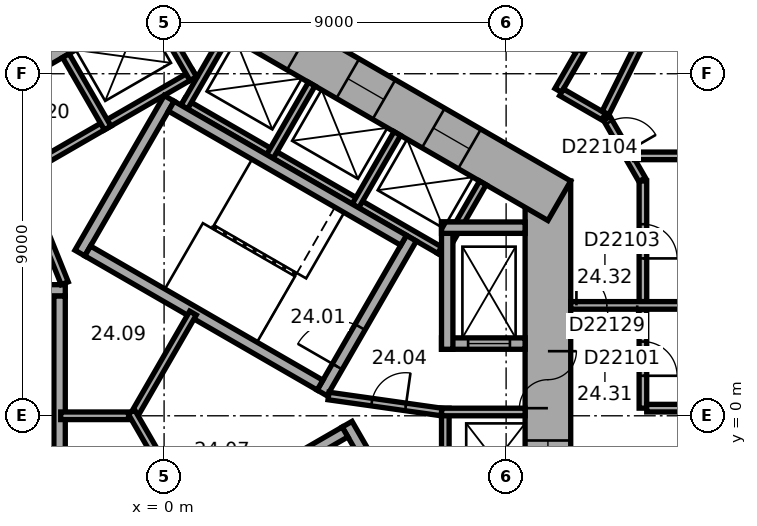
"""IFC4 building model, lengths in metres.
Left out: names, types, materials, properties, quantities, classifications, styles, units other than length and angle.
Written with IfcOpenShell. Run it as: python <this file> out.ifc"""

import sys

from ifc_helpers import new_model, si_unit, direction, frame, frame_2d, origin, place, context, subcontext, project, spatial, rectangle, extrude, element, fill, save


model = new_model("IFC4")
c1 = context("Model", 3, precision=1e-05, world=origin(), true_north=direction((0.0, 1.0)))
c2 = subcontext(c1, "Body", "Model", "MODEL_VIEW")
j1 = project(units=[si_unit("LENGTHUNIT", "METRE"), si_unit("PLANEANGLEUNIT", "RADIAN")], contexts=[c1])
p1 = place(None, origin())
s1 = spatial("IfcSite", under=j1, at=p1, CompositionType="ELEMENT")
p2 = place(p1, origin())
s2 = spatial("IfcBuilding", under=s1, at=p2, CompositionType="ELEMENT")
p3 = place(p2, frame((0.0, 0.0, 103.4)))
s3 = spatial("IfcBuildingStorey", under=s2, at=p3, CompositionType="ELEMENT", Elevation=103.4)
p4 = place(p3, frame((10.1, -6.177, 0.0), z_axis=(0.0, 0.0, 1.0), x_axis=(0.0, 1.0, 0.0)))
e1 = element("IfcWall", 1, at=p4, inside=s3, PredefinedType="SHEAR", context=c2, shape_type="SweptSolid", body=[
    extrude(rectangle(XDim=12.355, YDim=1.2, at=frame_2d((6.177, 0.0))), origin(), (0.0, 0.0, 1.0), 3.3),
])
p5 = place(p4, frame((6.378, 0.0, 0.0)))
e2 = element("IfcOpeningElement", 2, at=p5, cuts=e1, PredefinedType="OPENING", context=c2, shape_type="SweptSolid", body=[
    extrude(rectangle(XDim=1.5, YDim=2.1, at=frame_2d((0.75, 1.05))), frame((0.0, 0.61, 0.0), z_axis=(0.0, -1.0, 0.0), x_axis=(1.0, 0.0, 0.0)), (0.0, 0.0, 1.0), 1.22),
])
p6 = place(p4, frame((1.828, 0.0, 0.0)))
e3 = element("IfcOpeningElement", 3, at=p6, cuts=e1, PredefinedType="OPENING", context=c2, shape_type="SweptSolid", body=[
    extrude(rectangle(XDim=1.1, YDim=2.1, at=frame_2d((0.55, 1.05))), frame((0.0, 0.61, 0.0), z_axis=(0.0, -1.0, 0.0), x_axis=(1.0, 0.0, 0.0)), (0.0, 0.0, 1.0), 1.22),
])
p7 = place(p4, frame((4.427, 0.0, 0.0)))
e4 = element("IfcOpeningElement", 4, at=p7, cuts=e1, PredefinedType="OPENING", context=c2, shape_type="SweptSolid", body=[
    extrude(rectangle(XDim=1.1, YDim=2.1, at=frame_2d((0.55, 1.05))), frame((0.0, 0.61, 0.0), z_axis=(0.0, -1.0, 0.0), x_axis=(1.0, 0.0, 0.0)), (0.0, 0.0, 1.0), 1.22),
])
p8 = place(p3, frame((10.4, 5.658, 0.0), z_axis=(0.0, 0.0, 1.0), x_axis=(-0.866021384402, 0.500006961711, 0.0)))
e5 = element("IfcWall", 5, at=p8, inside=s3, PredefinedType="SHEAR", context=c2, shape_type="SweptSolid", body=[
    extrude(rectangle(XDim=12.355, YDim=1.2, at=frame_2d((6.178, 0.0))), origin(), (0.0, 0.0, 1.0), 3.3),
])
p9 = place(p8, frame((2.728, 0.0, 0.0)))
e6 = element("IfcOpeningElement", 6, at=p9, cuts=e5, PredefinedType="OPENING", context=c2, shape_type="SweptSolid", body=[
    extrude(rectangle(XDim=1.1, YDim=2.1, at=frame_2d((0.55, 1.05))), frame((0.0, 0.61, 0.0), z_axis=(0.0, -1.0, 0.0), x_axis=(1.0, 0.0, 0.0)), (0.0, 0.0, 1.0), 1.22),
])
p10 = place(p8, frame((5.328, 0.0, 0.0)))
e7 = element("IfcOpeningElement", 7, at=p10, cuts=e5, PredefinedType="OPENING", context=c2, shape_type="SweptSolid", body=[
    extrude(rectangle(XDim=1.1, YDim=2.1, at=frame_2d((0.55, 1.05))), frame((0.0, 0.61, 0.0), z_axis=(0.0, -1.0, 0.0), x_axis=(1.0, 0.0, 0.0)), (0.0, 0.0, 1.0), 1.22),
])
p11 = place(p8, frame((7.928, 0.0, 0.0)))
e8 = element("IfcOpeningElement", 8, at=p11, cuts=e5, PredefinedType="OPENING", context=c2, shape_type="SweptSolid", body=[
    extrude(rectangle(XDim=1.1, YDim=2.1, at=frame_2d((0.55, 1.05))), frame((0.0, 0.61, 0.0), z_axis=(0.0, -1.0, 0.0), x_axis=(1.0, 0.0, 0.0)), (0.0, 0.0, 1.0), 1.22),
])
p12 = place(p3, frame((0.3, 11.836, 0.0), z_axis=(0.0, 0.0, 1.0), x_axis=(-0.866021384402, -0.500006961711, 0.0)))
e9 = element("IfcWall", 9, at=p12, inside=s3, PredefinedType="SHEAR", context=c2, shape_type="SweptSolid", body=[
    extrude(rectangle(XDim=12.355, YDim=1.2, at=frame_2d((6.178, 0.0))), origin(), (0.0, 0.0, 1.0), 3.3),
])
p13 = place(p12, frame((6.378, 0.0, 0.0)))
e10 = element("IfcOpeningElement", 10, at=p13, cuts=e9, PredefinedType="OPENING", context=c2, shape_type="SweptSolid", body=[
    extrude(rectangle(XDim=1.5, YDim=2.1, at=frame_2d((0.75, 1.05))), frame((0.0, 0.61, 0.0), z_axis=(0.0, -1.0, 0.0), x_axis=(1.0, 0.0, 0.0)), (0.0, 0.0, 1.0), 1.22),
])
p14 = place(p12, frame((1.828, 0.0, 0.0)))
e11 = element("IfcOpeningElement", 11, at=p14, cuts=e9, PredefinedType="OPENING", context=c2, shape_type="SweptSolid", body=[
    extrude(rectangle(XDim=1.1, YDim=2.1, at=frame_2d((0.55, 1.05))), frame((0.0, 0.61, 0.0), z_axis=(0.0, -1.0, 0.0), x_axis=(1.0, 0.0, 0.0)), (0.0, 0.0, 1.0), 1.22),
])
p15 = place(p3, frame((7.4, -5.2, 0.0), z_axis=(0.0, 0.0, 1.0), x_axis=(0.0, 1.0, 0.0)))
e12 = element("IfcWall", 12, at=p15, inside=s3, PredefinedType="PARTITIONING", context=c2, shape_type="SweptSolid", body=[
    extrude(rectangle(XDim=5.4, YDim=0.2, at=frame_2d((2.7, 0.0))), origin(), (0.0, 0.0, 1.0), 3.05),
])
p16 = place(p3, frame((7.3, 0.1, 0.0), z_axis=(0.0, 0.0, 1.0), x_axis=(1.0, 0.0, 0.0)))
e13 = element("IfcWall", 13, at=p16, inside=s3, PredefinedType="PARTITIONING", context=c2, shape_type="SweptSolid", body=[
    extrude(rectangle(XDim=2.2, YDim=0.2, at=frame_2d((1.1, 0.0))), origin(), (0.0, 0.0, 1.0), 3.05),
])
p17 = place(p3, frame((7.424, 4.259, 0.0), z_axis=(0.0, 0.0, 1.0), x_axis=(-0.866026010844, 0.49999894854, 0.0)))
e14 = element("IfcWall", 14, at=p17, inside=s3, PredefinedType="PARTITIONING", context=c2, shape_type="SweptSolid", body=[
    extrude(rectangle(XDim=8.0, YDim=0.2, at=frame_2d((4.0, 0.0))), origin(), (0.0, 0.0, 1.0), 3.05),
])
for number, where, z_axis, x_axis in (
    (15, (7.287, 4.222, 0.0), (0.0, 0.0, 1.0), (0.5, 0.866, 0.0)),
    (16, (5.036, 5.522, 0.0), (0.0, 0.0, 1.0), (0.5, 0.866, 0.0)),
    (17, (2.784, 6.822, 0.0), (0.0, 0.0, 1.0), (0.5, 0.866, 0.0)),
    (18, (0.532, 8.122, 0.0), (0.0, 0.0, 1.0), (0.5, 0.866, 0.0)),
):
    element("IfcWall", number, at=place(p3, frame(where, z_axis=z_axis, x_axis=x_axis)), inside=s3, PredefinedType="PARTITIONING", context=c2, shape_type="SweptSolid", body=[
        extrude(rectangle(XDim=2.2, YDim=0.2, at=frame_2d((1.1, 0.0))), origin(), (0.0, 0.0, 1.0), 3.05),
    ])
p18 = place(p3, frame((0.803, 9.009, 0.0), z_axis=(0.0, 0.0, 1.0), x_axis=(-0.866028230842, -0.499995103361, 0.0)))
e19 = element("IfcWall", 19, at=p18, inside=s3, PredefinedType="PARTITIONING", context=c2, shape_type="SweptSolid", body=[
    extrude(rectangle(XDim=5.4, YDim=0.2, at=frame_2d((2.7, 0.0))), origin(), (0.0, 0.0, 1.0), 3.05),
])
p19 = place(p3, frame((0.767, 8.872, 0.0), z_axis=(0.0, 0.0, 1.0), x_axis=(-0.499994660107, 0.866028486751, 0.0)))
e20 = element("IfcWall", 20, at=p19, inside=s3, PredefinedType="PARTITIONING", context=c2, shape_type="SweptSolid", body=[
    extrude(rectangle(XDim=2.2, YDim=0.2, at=frame_2d((1.1, 0.0))), origin(), (0.0, 0.0, 1.0), 3.05),
])
p20 = place(p3, frame((-1.485, 7.572, 0.0), z_axis=(0.0, 0.0, 1.0), x_axis=(-0.50002983664, 0.866008176907, 0.0)))
e21 = element("IfcWall", 21, at=p20, inside=s3, PredefinedType="PARTITIONING", context=c2, shape_type="SweptSolid", body=[
    extrude(rectangle(XDim=2.2, YDim=0.2, at=frame_2d((1.1, 0.0))), origin(), (0.0, 0.0, 1.0), 3.05),
])
p21 = place(p3, frame((4.158, 0.602, 0.0), z_axis=(0.0, 0.0, 1.0), x_axis=(0.499977259774, 0.866038532462, 0.0)))
e22 = element("IfcWall", 22, at=p21, inside=s3, PredefinedType="SHEAR", context=c2, shape_type="SweptSolid", body=[
    extrude(rectangle(XDim=4.7, YDim=0.3, at=frame_2d((2.35, 0.0))), origin(), (0.0, 0.0, 1.0), 3.05),
])
p22 = place(p21, frame((0.8, 0.0, 0.0)))
e23 = element("IfcOpeningElement", 23, at=p22, cuts=e22, PredefinedType="OPENING", context=c2, shape_type="SweptSolid", body=[
    extrude(rectangle(XDim=1.2, YDim=2.1, at=frame_2d((0.6, 1.05))), frame((0.0, 0.16, 0.0), z_axis=(0.0, -1.0, 0.0), x_axis=(1.0, 0.0, 0.0)), (0.0, 0.0, 1.0), 0.32),
])
p23 = place(p3, frame((-2.216, 4.282, 0.0), z_axis=(0.0, 0.0, 1.0), x_axis=(0.499977259774, 0.866038532462, 0.0)))
e24 = element("IfcWall", 24, at=p23, inside=s3, PredefinedType="SHEAR", context=c2, shape_type="SweptSolid", body=[
    extrude(rectangle(XDim=4.7, YDim=0.3, at=frame_2d((2.35, 0.0))), origin(), (0.0, 0.0, 1.0), 3.05),
])
for number, where, z_axis, x_axis in (
    (25, (4.103, 0.807, 0.0), (0.0, 0.0, 1.0), (-0.866, 0.5, 0.0)),
    (26, (6.303, 4.617, 0.0), (0.0, 0.0, 1.0), (-0.866, 0.5, 0.0)),
):
    element("IfcWall", number, at=place(p3, frame(where, z_axis=z_axis, x_axis=x_axis)), inside=s3, PredefinedType="SHEAR", context=c2, shape_type="SweptSolid", body=[
        extrude(rectangle(XDim=7.06, YDim=0.3, at=frame_2d((3.53, 0.0))), origin(), (0.0, 0.0, 1.0), 3.05),
    ])
p24 = place(p3, frame((-2.6, 3.3, 0.0), z_axis=(0.0, 0.0, 1.0), x_axis=(-1.0, 0.0, 0.0)))
e27 = element("IfcWall", 27, at=p24, inside=s3, PredefinedType="SHEAR", context=c2, shape_type="SweptSolid", body=[
    extrude(rectangle(XDim=4.7, YDim=0.3, at=frame_2d((2.35, 0.0))), origin(), (0.0, 0.0, 1.0), 3.05),
])
p25 = place(p24, frame((0.8, 0.0, 0.0)))
e28 = element("IfcOpeningElement", 28, at=p25, cuts=e27, PredefinedType="OPENING", context=c2, shape_type="SweptSolid", body=[
    extrude(rectangle(XDim=1.2, YDim=2.1, at=frame_2d((0.6, 1.05))), frame((0.0, 0.16, 0.0), z_axis=(0.0, -1.0, 0.0), x_axis=(1.0, 0.0, 0.0)), (0.0, 0.0, 1.0), 0.32),
])
p26 = place(p3, frame((-2.75, 3.15, 0.0), z_axis=(0.0, 0.0, 1.0), x_axis=(0.0, -1.0, 0.0)))
e29 = element("IfcWall", 29, at=p26, inside=s3, PredefinedType="SHEAR", context=c2, shape_type="SweptSolid", body=[
    extrude(rectangle(XDim=7.06, YDim=0.3, at=frame_2d((3.53, 0.0))), origin(), (0.0, 0.0, 1.0), 3.05),
])
p27 = place(p3, frame((4.816, -0.222, 0.0), z_axis=(0.0, 0.0, 1.0), x_axis=(0.499977259774, -0.866038532462, 0.0)))
e30 = element("IfcWall", 30, at=p27, inside=s3, PredefinedType="SHEAR", context=c2, shape_type="SweptSolid", body=[
    extrude(rectangle(XDim=4.7, YDim=0.3, at=frame_2d((2.35, 0.0))), origin(), (0.0, 0.0, 1.0), 3.05),
])
p28 = place(p3, frame((-1.353, -3.957, 0.0), z_axis=(0.0, 0.0, 1.0), x_axis=(0.866027801685, 0.499995846692, 0.0)))
e31 = element("IfcWall", 31, at=p28, inside=s3, PredefinedType="SHEAR", context=c2, shape_type="SweptSolid", body=[
    extrude(rectangle(XDim=7.06, YDim=0.3, at=frame_2d((3.53, 0.0))), origin(), (0.0, 0.0, 1.0), 3.05),
])
p29 = place(p3, frame((7.3, 1.9, 0.0), z_axis=(0.0, 0.0, 1.0), x_axis=(1.0, 0.0, 0.0)))
e32 = element("IfcWall", 32, at=p29, inside=s3, PredefinedType="SHEAR", context=c2, shape_type="SweptSolid", body=[
    extrude(rectangle(XDim=2.2, YDim=0.3, at=frame_2d((1.1, 0.0))), origin(), (0.0, 0.0, 1.0), 3.05),
])
p30 = place(p29, frame((0.7, 0.0, 0.0)))
e33 = element("IfcOpeningElement", 33, at=p30, cuts=e32, PredefinedType="OPENING", context=c2, shape_type="SweptSolid", body=[
    extrude(rectangle(XDim=1.1, YDim=2.1, at=frame_2d((0.55, 1.05))), frame((0.0, 0.16, 0.0), z_axis=(0.0, -1.0, 0.0), x_axis=(1.0, 0.0, 0.0)), (0.0, 0.0, 1.0), 0.32),
])
p31 = place(p3, frame((7.45, 1.75, 0.0), z_axis=(0.0, 0.0, 1.0), x_axis=(0.0, 1.0, 0.0)))
e34 = element("IfcWall", 34, at=p31, inside=s3, PredefinedType="SHEAR", context=c2, shape_type="SweptSolid", body=[
    extrude(rectangle(XDim=3.35, YDim=0.3, at=frame_2d((1.675, 0.0))), origin(), (0.0, 0.0, 1.0), 3.05),
])
p32 = place(p3, frame((7.3, 4.95, 0.0), z_axis=(0.0, 0.0, 1.0), x_axis=(1.0, 0.0, 0.0)))
e35 = element("IfcWall", 35, at=p32, inside=s3, PredefinedType="SHEAR", context=c2, shape_type="SweptSolid", body=[
    extrude(rectangle(XDim=2.2, YDim=0.3, at=frame_2d((1.1, 0.0))), origin(), (0.0, 0.0, 1.0), 3.05),
])
p33 = place(p3, frame((4.327, 0.521, 0.0), z_axis=(0.0, 0.0, 1.0), x_axis=(0.990124376366, -0.14019172346, 0.0)))
e36 = element("IfcWall", 36, at=p33, inside=s3, PredefinedType="PARTITIONING", context=c2, shape_type="SweptSolid", body=[
    extrude(rectangle(XDim=3.002, YDim=0.2, at=frame_2d((1.501, 0.0))), origin(), (0.0, 0.0, 1.0), 3.05),
])
p34 = place(p33, frame((1.15, 0.0, 0.0)))
e37 = element("IfcOpeningElement", 37, at=p34, cuts=e36, PredefinedType="OPENING", context=c2, shape_type="SweptSolid", body=[
    extrude(rectangle(XDim=0.9, YDim=2.1, at=frame_2d((0.45, 1.05))), frame((0.0, 0.11, 0.0), z_axis=(0.0, -1.0, 0.0), x_axis=(1.0, 0.0, 0.0)), (0.0, 0.0, 1.0), 0.22),
])
p35 = place(p3, frame((-2.615, 3.487, 0.0), z_axis=(0.0, 0.0, 1.0), x_axis=(-0.373576831041, 0.92759924068, 0.0)))
e38 = element("IfcWall", 38, at=p35, inside=s3, PredefinedType="PARTITIONING", context=c2, shape_type="SweptSolid", body=[
    extrude(rectangle(XDim=3.002, YDim=0.2, at=frame_2d((1.501, 0.0))), origin(), (0.0, 0.0, 1.0), 3.05),
])
p36 = place(p35, frame((1.15, 0.0, 0.0)))
e39 = element("IfcOpeningElement", 39, at=p36, cuts=e38, PredefinedType="OPENING", context=c2, shape_type="SweptSolid", body=[
    extrude(rectangle(XDim=0.9, YDim=2.1, at=frame_2d((0.45, 1.05))), frame((0.0, 0.11, 0.0), z_axis=(0.0, -1.0, 0.0), x_axis=(1.0, 0.0, 0.0)), (0.0, 0.0, 1.0), 0.22),
])
p37 = place(p3, frame((-0.68, 0.0, 0.0), z_axis=(0.0, 0.0, 1.0), x_axis=(-1.0, 0.0, 0.0)))
e40 = element("IfcWall", 40, at=p37, inside=s3, PredefinedType="PARTITIONING", context=c2, shape_type="SweptSolid", body=[
    extrude(rectangle(XDim=2.04, YDim=0.2, at=frame_2d((1.02, 0.0))), origin(), (0.0, 0.0, 1.0), 3.05),
])
for number, where, z_axis, x_axis in (
    (41, (-0.86, -0.104, 0.0), (0.0, 0.0, 1.0), (0.5, 0.866, 0.0)),
    (42, (-0.86, 0.104, 0.0), (0.0, 0.0, 1.0), (0.5, -0.866, 0.0)),
):
    element("IfcWall", number, at=place(p3, frame(where, z_axis=z_axis, x_axis=x_axis)), inside=s3, PredefinedType="PARTITIONING", context=c2, shape_type="SweptSolid", body=[
        extrude(rectangle(XDim=3.24, YDim=0.2, at=frame_2d((1.62, 0.0))), origin(), (0.0, 0.0, 1.0), 3.05),
    ])
p38 = place(p3, frame((10.371, 8.561, 0.0), z_axis=(0.0, 0.0, 1.0), x_axis=(0.499986357472, 0.866033280158, 0.0)))
e43 = element("IfcWall", 43, at=p38, inside=s3, PredefinedType="PARTITIONING", context=c2, shape_type="SweptSolid", body=[
    extrude(rectangle(XDim=1.201, YDim=0.2, at=frame_2d((0.601, 0.0))), origin(), (0.0, 0.0, 1.0), 3.05),
])
p39 = place(p3, frame((11.566, 7.871, 0.0), z_axis=(0.0, 0.0, 1.0), x_axis=(-0.866004557827, 0.500036104519, 0.0)))
e44 = element("IfcWall", 44, at=p39, inside=s3, PredefinedType="PARTITIONING", context=c2, shape_type="SweptSolid", body=[
    extrude(rectangle(XDim=1.28, YDim=0.2, at=frame_2d((0.64, 0.0))), origin(), (0.0, 0.0, 1.0), 3.05),
])
p40 = place(p3, frame((12.58, 6.212, 0.0), z_axis=(0.0, 0.0, 1.0), x_axis=(-0.500063286585, 0.865988862174, 0.0)))
e45 = element("IfcWall", 45, at=p40, inside=s3, PredefinedType="PARTITIONING", context=c2, shape_type="SweptSolid", body=[
    extrude(rectangle(XDim=1.86, YDim=0.2, at=frame_2d((0.93, 0.0))), origin(), (0.0, 0.0, 1.0), 3.05),
])
p41 = place(p40, frame((0.842, 0.0, 0.0)))
e46 = element("IfcOpeningElement", 46, at=p41, cuts=e45, PredefinedType="OPENING", context=c2, shape_type="SweptSolid", body=[
    extrude(rectangle(XDim=0.9, YDim=2.1, at=frame_2d((0.45, 1.05))), frame((0.0, 0.11, 0.0), z_axis=(0.0, -1.0, 0.0), x_axis=(1.0, 0.0, 0.0)), (0.0, 0.0, 1.0), 0.22),
])
p42 = place(p3, frame((12.6, 0.201, 0.0), z_axis=(0.0, 0.0, 1.0), x_axis=(0.0, 1.0, 0.0)))
e47 = element("IfcWall", 47, at=p42, inside=s3, PredefinedType="PARTITIONING", context=c2, shape_type="SweptSolid", body=[
    extrude(rectangle(XDim=2.604, YDim=0.2, at=frame_2d((1.302, 0.0))), origin(), (0.0, 0.0, 1.0), 3.05),
])
p43 = place(p42, frame((0.852, 0.0, 0.0)))
e48 = element("IfcOpeningElement", 48, at=p43, cuts=e47, PredefinedType="OPENING", context=c2, shape_type="SweptSolid", body=[
    extrude(rectangle(XDim=0.9, YDim=2.1, at=frame_2d((0.45, 1.05))), frame((0.0, 0.11, 0.0), z_axis=(0.0, -1.0, 0.0), x_axis=(1.0, 0.0, 0.0)), (0.0, 0.0, 1.0), 0.22),
])
p44 = place(p3, frame((12.6, 3.004, 0.0), z_axis=(0.0, 0.0, 1.0), x_axis=(0.0, 1.0, 0.0)))
e49 = element("IfcWall", 49, at=p44, inside=s3, PredefinedType="PARTITIONING", context=c2, shape_type="SweptSolid", body=[
    extrude(rectangle(XDim=3.173, YDim=0.2, at=frame_2d((1.586, 0.0))), origin(), (0.0, 0.0, 1.0), 3.05),
])
p45 = place(p44, frame((1.136, 0.0, 0.0)))
e50 = element("IfcOpeningElement", 50, at=p45, cuts=e49, PredefinedType="OPENING", context=c2, shape_type="SweptSolid", body=[
    extrude(rectangle(XDim=0.9, YDim=2.1, at=frame_2d((0.45, 1.05))), frame((0.0, 0.11, 0.0), z_axis=(0.0, -1.0, 0.0), x_axis=(1.0, 0.0, 0.0)), (0.0, 0.0, 1.0), 0.22),
])
p46 = place(p3, frame((13.701, 0.201, 0.0), z_axis=(0.0, 0.0, 1.0), x_axis=(-1.0, 0.0, 0.0)))
e51 = element("IfcWall", 51, at=p46, inside=s3, PredefinedType="PARTITIONING", context=c2, shape_type="SweptSolid", body=[
    extrude(rectangle(XDim=1.001, YDim=0.2, at=frame_2d((0.5, 0.0))), origin(), (0.0, 0.0, 1.0), 3.05),
])
p47 = place(p3, frame((15.915, 16.592, 0.0), z_axis=(0.0, 0.0, 1.0), x_axis=(-0.446199736347, -0.894933402709, 0.0)))
e52 = element("IfcWall", 52, at=p47, inside=s3, PredefinedType="PARTITIONING", context=c2, shape_type="SweptSolid", body=[
    extrude(rectangle(XDim=9.635, YDim=0.2, at=frame_2d((4.817, 0.0))), origin(), (0.0, 0.0, 1.0), 3.05),
])
p48 = place(p3, frame((21.95, 2.905, 0.0), z_axis=(0.0, 0.0, 1.0), x_axis=(-1.0, 0.0, 0.0)))
e53 = element("IfcWall", 53, at=p48, inside=s3, PredefinedType="PARTITIONING", context=c2, shape_type="SweptSolid", body=[
    extrude(rectangle(XDim=11.25, YDim=0.2, at=frame_2d((5.625, 0.0))), origin(), (0.0, 0.0, 1.0), 3.05),
])
p49 = place(p48, frame((9.5, 0.0, 0.0)))
e54 = element("IfcOpeningElement", 54, at=p49, cuts=e53, PredefinedType="OPENING", context=c2, shape_type="SweptSolid", body=[
    extrude(rectangle(XDim=1.6, YDim=2.1, at=frame_2d((0.8, 1.05))), frame((0.0, 0.11, 0.0), z_axis=(0.0, -1.0, 0.0), x_axis=(1.0, 0.0, 0.0)), (0.0, 0.0, 1.0), 0.22),
])
p50 = place(p3, frame((21.95, 6.839, 0.0), z_axis=(0.0, 0.0, 1.0), x_axis=(-1.0, 0.0, 0.0)))
e55 = element("IfcWall", 55, at=p50, inside=s3, PredefinedType="PARTITIONING", context=c2, shape_type="SweptSolid", body=[
    extrude(rectangle(XDim=9.572, YDim=0.2, at=frame_2d((4.786, 0.0))), origin(), (0.0, 0.0, 1.0), 3.05),
])
p51 = place(p5, origin())
e56 = element("IfcDoor", 56, at=p51, inside=s3, OperationType="DOUBLE_DOOR_SINGLE_SWING", PredefinedType="DOOR", context=c2, shape_type="SweptSolid", body=[
    extrude(rectangle(XDim=1.5, YDim=2.1, at=frame_2d((0.75, 1.05))), frame((0.0, 0.025, 0.0), z_axis=(0.0, -1.0, 0.0), x_axis=(1.0, 0.0, 0.0)), (0.0, 0.0, 1.0), 0.05),
])
fill(e2, e56)
p52 = place(p22, origin())
e57 = element("IfcDoor", 57, at=p52, inside=s3, OperationType="SINGLE_SWING_RIGHT", PredefinedType="DOOR", context=c2, shape_type="SweptSolid", body=[
    extrude(rectangle(XDim=1.2, YDim=2.1, at=frame_2d((0.6, 1.05))), frame((0.0, 0.025, 0.0), z_axis=(0.0, -1.0, 0.0), x_axis=(1.0, 0.0, 0.0)), (0.0, 0.0, 1.0), 0.05),
])
fill(e23, e57)
p53 = place(p34, origin())
e58 = element("IfcDoor", 58, at=p53, inside=s3, OperationType="SINGLE_SWING_LEFT", PredefinedType="DOOR", context=c2, shape_type="SweptSolid", body=[
    extrude(rectangle(XDim=0.9, YDim=2.1, at=frame_2d((0.45, 1.05))), frame((0.0, 0.025, 0.0), z_axis=(0.0, -1.0, 0.0), x_axis=(1.0, 0.0, 0.0)), (0.0, 0.0, 1.0), 0.05),
])
fill(e37, e58)
p54 = place(p30, origin())
e59 = element("IfcDoor", 59, at=p54, inside=s3, OperationType="DOUBLE_DOOR_SLIDING", PredefinedType="DOOR", context=c2, shape_type="SweptSolid", body=[
    extrude(rectangle(XDim=1.1, YDim=2.1, at=frame_2d((0.55, 1.05))), frame((0.0, 0.025, 0.0), z_axis=(0.0, -1.0, 0.0), x_axis=(1.0, 0.0, 0.0)), (0.0, 0.0, 1.0), 0.05),
])
fill(e33, e59)
p55 = place(p7, origin())
e60 = element("IfcDoor", 60, at=p55, inside=s3, OperationType="DOUBLE_DOOR_SLIDING", PredefinedType="DOOR", context=c2, shape_type="SweptSolid", body=[
    extrude(rectangle(XDim=1.1, YDim=2.1, at=frame_2d((0.55, 1.05))), frame((0.0, 0.025, 0.0), z_axis=(0.0, -1.0, 0.0), x_axis=(1.0, 0.0, 0.0)), (0.0, 0.0, 1.0), 0.05),
])
fill(e4, e60)
p56 = place(p9, origin())
e61 = element("IfcDoor", 61, at=p56, inside=s3, OperationType="DOUBLE_DOOR_SLIDING", PredefinedType="DOOR", context=c2, shape_type="SweptSolid", body=[
    extrude(rectangle(XDim=1.1, YDim=2.1, at=frame_2d((0.55, 1.05))), frame((0.0, 0.025, 0.0), z_axis=(0.0, -1.0, 0.0), x_axis=(1.0, 0.0, 0.0)), (0.0, 0.0, 1.0), 0.05),
])
fill(e6, e61)
p57 = place(p10, origin())
e62 = element("IfcDoor", 62, at=p57, inside=s3, OperationType="DOUBLE_DOOR_SLIDING", PredefinedType="DOOR", context=c2, shape_type="SweptSolid", body=[
    extrude(rectangle(XDim=1.1, YDim=2.1, at=frame_2d((0.55, 1.05))), frame((0.0, 0.025, 0.0), z_axis=(0.0, -1.0, 0.0), x_axis=(1.0, 0.0, 0.0)), (0.0, 0.0, 1.0), 0.05),
])
fill(e7, e62)
p58 = place(p43, origin())
e63 = element("IfcDoor", 63, at=p58, inside=s3, OperationType="SINGLE_SWING_LEFT", PredefinedType="DOOR", context=c2, shape_type="SweptSolid", body=[
    extrude(rectangle(XDim=0.9, YDim=2.1, at=frame_2d((0.45, 1.05))), frame((0.0, 0.025, 0.0), z_axis=(0.0, -1.0, 0.0), x_axis=(1.0, 0.0, 0.0)), (0.0, 0.0, 1.0), 0.05),
])
fill(e48, e63)
p59 = place(p45, origin())
e64 = element("IfcDoor", 64, at=p59, inside=s3, OperationType="SINGLE_SWING_LEFT", PredefinedType="DOOR", context=c2, shape_type="SweptSolid", body=[
    extrude(rectangle(XDim=0.9, YDim=2.1, at=frame_2d((0.45, 1.05))), frame((0.0, 0.025, 0.0), z_axis=(0.0, -1.0, 0.0), x_axis=(1.0, 0.0, 0.0)), (0.0, 0.0, 1.0), 0.05),
])
fill(e50, e64)
p60 = place(p41, origin())
e65 = element("IfcDoor", 65, at=p60, inside=s3, OperationType="SINGLE_SWING_LEFT", PredefinedType="DOOR", context=c2, shape_type="SweptSolid", body=[
    extrude(rectangle(XDim=0.9, YDim=2.1, at=frame_2d((0.45, 1.05))), frame((0.0, 0.025, 0.0), z_axis=(0.0, -1.0, 0.0), x_axis=(1.0, 0.0, 0.0)), (0.0, 0.0, 1.0), 0.05),
])
fill(e46, e65)
p61 = place(p49, origin())
e66 = element("IfcDoor", 66, at=p61, inside=s3, OperationType="DOUBLE_DOOR_SINGLE_SWING", PredefinedType="DOOR", context=c2, shape_type="SweptSolid", body=[
    extrude(rectangle(XDim=1.6, YDim=2.1, at=frame_2d((0.8, 1.05))), frame((0.0, 0.025, 0.0), z_axis=(0.0, -1.0, 0.0), x_axis=(1.0, 0.0, 0.0)), (0.0, 0.0, 1.0), 0.05),
])
fill(e54, e66)
save(model, sys.argv[1])
